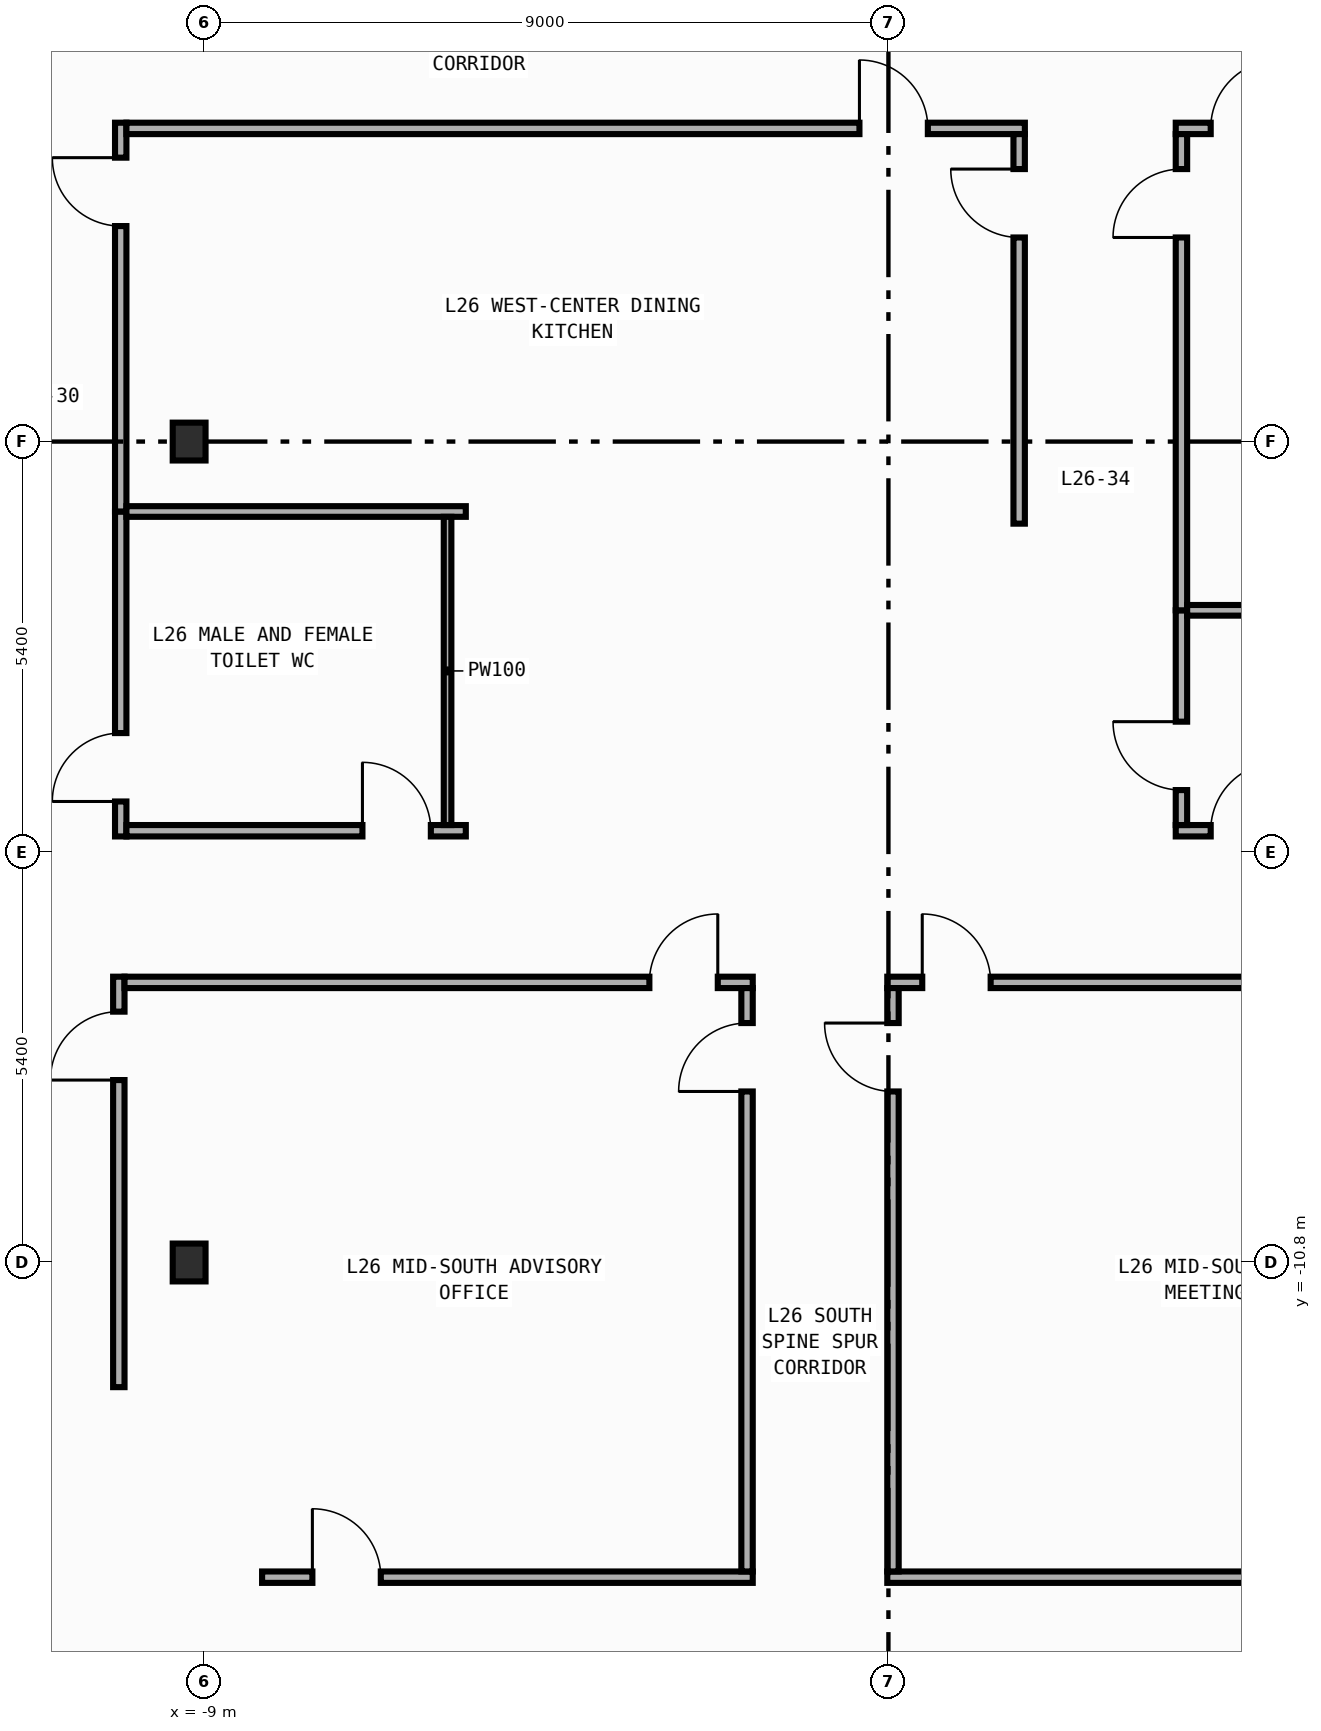
"""IFC4 building model, lengths in metres.
Left out: names, types, materials, properties, quantities, classifications, styles, units other than length and angle.
Written with IfcOpenShell. Run it as: python <this file> out.ifc"""

import sys

from ifc_helpers import new_model, si_unit, direction, frame, frame_2d, origin, origin_2d, place, context, subcontext, project, spatial, rectangle, i_section, extrude, element, fill, save


model = new_model("IFC4")
c1 = context("Model", 3, precision=1e-05, world=origin(), true_north=direction((0.0, 1.0)))
c2 = subcontext(c1, "Body", "Model", "MODEL_VIEW")
j1 = project(units=[si_unit("LENGTHUNIT", "METRE"), si_unit("PLANEANGLEUNIT", "RADIAN")], contexts=[c1])
p1 = place(None, origin())
s1 = spatial("IfcSite", under=j1, at=p1, CompositionType="ELEMENT")
p2 = place(p1, origin())
s2 = spatial("IfcBuilding", under=s1, at=p2, CompositionType="ELEMENT")
p3 = place(p2, frame((0.0, 0.0, 114.2)))
s3 = spatial("IfcBuildingStorey", under=s2, at=p3, CompositionType="ELEMENT", Elevation=114.2)
for number, where, z_axis, x_axis in (
    (1, (-9.2, -10.8, 0.0), (0.0, 0.0, 1.0), (1.0, 0.0, 0.0)),
    (2, (-9.2, 0.0, 0.0), (0.0, 0.0, 1.0), (1.0, 0.0, 0.0)),
):
    element("IfcColumn", number, at=place(p3, frame(where, z_axis=z_axis, x_axis=x_axis)), inside=s3, PredefinedType="COLUMN", context=c2, shape_type="SweptSolid", body=[
        extrude(i_section(OverallWidth=0.432, OverallDepth=0.498, WebThickness=0.045, FlangeThickness=0.07, FilletRadius=0.022, at=origin_2d()), origin(), (0.0, 0.0, 1.0), 4.2),
    ])
p4 = place(p3, frame((-10.1, -5.195, 0.0), z_axis=(0.0, 0.0, 1.0), x_axis=(0.0, 1.0, 0.0)))
e3 = element("IfcWall", 3, at=p4, inside=s3, PredefinedType="PARTITIONING", context=c2, shape_type="SweptSolid", body=[
    extrude(rectangle(XDim=4.275, YDim=0.15, at=frame_2d((2.138, 0.0))), origin(), (0.0, 0.0, 1.0), 3.94),
])
p5 = place(p4, frame((0.46, 0.0, 0.0)))
e4 = element("IfcOpeningElement", 4, at=p5, cuts=e3, PredefinedType="OPENING", context=c2, shape_type="SweptSolid", body=[
    extrude(rectangle(XDim=0.9, YDim=2.15, at=frame_2d((0.45, 1.075))), frame((0.0, 0.085, 0.0), z_axis=(0.0, -1.0, 0.0), x_axis=(1.0, 0.0, 0.0)), (0.0, 0.0, 1.0), 0.17),
])
p6 = place(p3, frame((-10.1, -0.92, 0.0), z_axis=(0.0, 0.0, 1.0), x_axis=(0.0, 1.0, 0.0)))
e5 = element("IfcWall", 5, at=p6, inside=s3, PredefinedType="PARTITIONING", context=c2, shape_type="SweptSolid", body=[
    extrude(rectangle(XDim=5.115, YDim=0.15, at=frame_2d((2.558, 0.0))), origin(), (0.0, 0.0, 1.0), 3.94),
])
p7 = place(p6, frame((3.755, 0.0, 0.0)))
e6 = element("IfcOpeningElement", 6, at=p7, cuts=e5, PredefinedType="OPENING", context=c2, shape_type="SweptSolid", body=[
    extrude(rectangle(XDim=0.9, YDim=2.15, at=frame_2d((0.45, 1.075))), frame((0.0, 0.085, 0.0), z_axis=(0.0, -1.0, 0.0), x_axis=(1.0, 0.0, 0.0)), (0.0, 0.0, 1.0), 0.17),
])
p8 = place(p3, frame((-10.125, -12.44, 0.0), z_axis=(0.0, 0.0, 1.0), x_axis=(0.0, 1.0, 0.0)))
e7 = element("IfcWall", 7, at=p8, inside=s3, PredefinedType="PARTITIONING", context=c2, shape_type="SweptSolid", body=[
    extrude(rectangle(XDim=5.4, YDim=0.15, at=frame_2d((2.7, 0.0))), origin(), (0.0, 0.0, 1.0), 3.94),
])
p9 = place(p8, frame((4.04, 0.0, 0.0)))
e8 = element("IfcOpeningElement", 8, at=p9, cuts=e7, PredefinedType="OPENING", context=c2, shape_type="SweptSolid", body=[
    extrude(rectangle(XDim=0.9, YDim=2.15, at=frame_2d((0.45, 1.075))), frame((0.0, 0.085, 0.0), z_axis=(0.0, -1.0, 0.0), x_axis=(1.0, 0.0, 0.0)), (0.0, 0.0, 1.0), 0.17),
])
p10 = place(p3, frame((3.78, 4.12, 0.0), z_axis=(0.0, 0.0, 1.0), x_axis=(1.0, 0.0, 0.0)))
e9 = element("IfcWall", 9, at=p10, inside=s3, PredefinedType="PARTITIONING", context=c2, shape_type="SweptSolid", body=[
    extrude(rectangle(XDim=6.245, YDim=0.15, at=frame_2d((3.123, 0.0))), origin(), (0.0, 0.0, 1.0), 3.94),
])
p11 = place(p10, frame((0.46, 0.0, 0.0)))
e10 = element("IfcOpeningElement", 10, at=p11, cuts=e9, PredefinedType="OPENING", context=c2, shape_type="SweptSolid", body=[
    extrude(rectangle(XDim=0.9, YDim=2.15, at=frame_2d((0.45, 1.075))), frame((0.0, 0.085, 0.0), z_axis=(0.0, -1.0, 0.0), x_axis=(1.0, 0.0, 0.0)), (0.0, 0.0, 1.0), 0.17),
])
p12 = place(p3, frame((-10.025, 4.12, 0.0), z_axis=(0.0, 0.0, 1.0), x_axis=(1.0, 0.0, 0.0)))
e11 = element("IfcWall", 11, at=p12, inside=s3, PredefinedType="PARTITIONING", context=c2, shape_type="SweptSolid", body=[
    extrude(rectangle(XDim=11.82, YDim=0.15, at=frame_2d((5.91, 0.0))), origin(), (0.0, 0.0, 1.0), 3.94),
])
p13 = place(p12, frame((9.644, 0.0, 0.0)))
e12 = element("IfcOpeningElement", 12, at=p13, cuts=e11, PredefinedType="OPENING", context=c2, shape_type="SweptSolid", body=[
    extrude(rectangle(XDim=0.9, YDim=2.15, at=frame_2d((0.45, 1.075))), frame((0.0, 0.085, 0.0), z_axis=(0.0, -1.0, 0.0), x_axis=(1.0, 0.0, 0.0)), (0.0, 0.0, 1.0), 0.17),
])
p14 = place(p3, frame((3.78, -5.12, 0.0), z_axis=(0.0, 0.0, 1.0), x_axis=(1.0, 0.0, 0.0)))
e13 = element("IfcWall", 13, at=p14, inside=s3, PredefinedType="PARTITIONING", context=c2, shape_type="SweptSolid", body=[
    extrude(rectangle(XDim=3.26, YDim=0.15, at=frame_2d((1.63, 0.0))), origin(), (0.0, 0.0, 1.0), 3.94),
])
p15 = place(p14, frame((0.46, 0.0, 0.0)))
e14 = element("IfcOpeningElement", 14, at=p15, cuts=e13, PredefinedType="OPENING", context=c2, shape_type="SweptSolid", body=[
    extrude(rectangle(XDim=0.9, YDim=2.15, at=frame_2d((0.45, 1.075))), frame((0.0, 0.085, 0.0), z_axis=(0.0, -1.0, 0.0), x_axis=(1.0, 0.0, 0.0)), (0.0, 0.0, 1.0), 0.17),
])
p16 = place(p3, frame((-10.025, -5.12, 0.0), z_axis=(0.0, 0.0, 1.0), x_axis=(1.0, 0.0, 0.0)))
e15 = element("IfcWall", 15, at=p16, inside=s3, PredefinedType="PARTITIONING", context=c2, shape_type="SweptSolid", body=[
    extrude(rectangle(XDim=4.465, YDim=0.15, at=frame_2d((2.232, 0.0))), origin(), (0.0, 0.0, 1.0), 3.94),
])
p17 = place(p16, frame((3.105, 0.0, 0.0)))
e16 = element("IfcOpeningElement", 16, at=p17, cuts=e15, PredefinedType="OPENING", context=c2, shape_type="SweptSolid", body=[
    extrude(rectangle(XDim=0.9, YDim=2.15, at=frame_2d((0.45, 1.075))), frame((0.0, 0.085, 0.0), z_axis=(0.0, -1.0, 0.0), x_axis=(1.0, 0.0, 0.0)), (0.0, 0.0, 1.0), 0.17),
])
p18 = place(p3, frame((-10.05, -7.115, 0.0), z_axis=(0.0, 0.0, 1.0), x_axis=(1.0, 0.0, 0.0)))
e17 = element("IfcWall", 17, at=p18, inside=s3, PredefinedType="PARTITIONING", context=c2, shape_type="SweptSolid", body=[
    extrude(rectangle(XDim=8.265, YDim=0.15, at=frame_2d((4.133, 0.0))), origin(), (0.0, 0.0, 1.0), 3.94),
])
p19 = place(p18, frame((6.905, 0.0, 0.0)))
e18 = element("IfcOpeningElement", 18, at=p19, cuts=e17, PredefinedType="OPENING", context=c2, shape_type="SweptSolid", body=[
    extrude(rectangle(XDim=0.9, YDim=2.15, at=frame_2d((0.45, 1.075))), frame((0.0, 0.085, 0.0), z_axis=(0.0, -1.0, 0.0), x_axis=(1.0, 0.0, 0.0)), (0.0, 0.0, 1.0), 0.17),
])
p20 = place(p3, frame((-0.015, -7.115, 0.0), z_axis=(0.0, 0.0, 1.0), x_axis=(1.0, 0.0, 0.0)))
e19 = element("IfcWall", 19, at=p20, inside=s3, PredefinedType="PARTITIONING", context=c2, shape_type="SweptSolid", body=[
    extrude(rectangle(XDim=10.065, YDim=0.15, at=frame_2d((5.032, 0.0))), origin(), (0.0, 0.0, 1.0), 3.94),
])
p21 = place(p20, frame((0.46, 0.0, 0.0)))
e20 = element("IfcOpeningElement", 20, at=p21, cuts=e19, PredefinedType="OPENING", context=c2, shape_type="SweptSolid", body=[
    extrude(rectangle(XDim=0.9, YDim=2.15, at=frame_2d((0.45, 1.075))), frame((0.0, 0.085, 0.0), z_axis=(0.0, -1.0, 0.0), x_axis=(1.0, 0.0, 0.0)), (0.0, 0.0, 1.0), 0.17),
])
p22 = place(p3, frame((3.855, -5.045, 0.0), z_axis=(0.0, 0.0, 1.0), x_axis=(0.0, 1.0, 0.0)))
e21 = element("IfcWall", 21, at=p22, inside=s3, PredefinedType="PARTITIONING", context=c2, shape_type="SweptSolid", body=[
    extrude(rectangle(XDim=2.825, YDim=0.15, at=frame_2d((1.413, 0.0))), origin(), (0.0, 0.0, 1.0), 3.94),
])
p23 = place(p22, frame((0.46, 0.0, 0.0)))
e22 = element("IfcOpeningElement", 22, at=p23, cuts=e21, PredefinedType="OPENING", context=c2, shape_type="SweptSolid", body=[
    extrude(rectangle(XDim=0.9, YDim=2.15, at=frame_2d((0.45, 1.075))), frame((0.0, 0.085, 0.0), z_axis=(0.0, -1.0, 0.0), x_axis=(1.0, 0.0, 0.0)), (0.0, 0.0, 1.0), 0.17),
])
p24 = place(p3, frame((3.855, -2.22, 0.0), z_axis=(0.0, 0.0, 1.0), x_axis=(0.0, 1.0, 0.0)))
e23 = element("IfcWall", 23, at=p24, inside=s3, PredefinedType="PARTITIONING", context=c2, shape_type="SweptSolid", body=[
    extrude(rectangle(XDim=6.265, YDim=0.15, at=frame_2d((3.132, 0.0))), origin(), (0.0, 0.0, 1.0), 3.94),
])
p25 = place(p24, frame((4.905, 0.0, 0.0)))
e24 = element("IfcOpeningElement", 24, at=p25, cuts=e23, PredefinedType="OPENING", context=c2, shape_type="SweptSolid", body=[
    extrude(rectangle(XDim=0.9, YDim=2.15, at=frame_2d((0.45, 1.075))), frame((0.0, 0.085, 0.0), z_axis=(0.0, -1.0, 0.0), x_axis=(1.0, 0.0, 0.0)), (0.0, 0.0, 1.0), 0.17),
])
p26 = place(p3, frame((1.72, -1.08, 0.0), z_axis=(0.0, 0.0, 1.0), x_axis=(0.0, 1.0, 0.0)))
e25 = element("IfcWall", 25, at=p26, inside=s3, PredefinedType="PARTITIONING", context=c2, shape_type="SweptSolid", body=[
    extrude(rectangle(XDim=5.125, YDim=0.15, at=frame_2d((2.562, 0.0))), origin(), (0.0, 0.0, 1.0), 3.94),
])
p27 = place(p26, frame((3.765, 0.0, 0.0)))
e26 = element("IfcOpeningElement", 26, at=p27, cuts=e25, PredefinedType="OPENING", context=c2, shape_type="SweptSolid", body=[
    extrude(rectangle(XDim=0.9, YDim=2.15, at=frame_2d((0.45, 1.075))), frame((0.0, 0.085, 0.0), z_axis=(0.0, -1.0, 0.0), x_axis=(1.0, 0.0, 0.0)), (0.0, 0.0, 1.0), 0.17),
])
p28 = place(p3, frame((-8.24, -14.94, 0.0), z_axis=(0.0, 0.0, 1.0), x_axis=(1.0, 0.0, 0.0)))
e27 = element("IfcWall", 27, at=p28, inside=s3, PredefinedType="PARTITIONING", context=c2, shape_type="SweptSolid", body=[
    extrude(rectangle(XDim=6.455, YDim=0.15, at=frame_2d((3.228, 0.0))), origin(), (0.0, 0.0, 1.0), 3.94),
])
p29 = place(p28, frame((0.662, 0.0, 0.0)))
e28 = element("IfcOpeningElement", 28, at=p29, cuts=e27, PredefinedType="OPENING", context=c2, shape_type="SweptSolid", body=[
    extrude(rectangle(XDim=0.9, YDim=2.15, at=frame_2d((0.45, 1.075))), frame((0.0, 0.085, 0.0), z_axis=(0.0, -1.0, 0.0), x_axis=(1.0, 0.0, 0.0)), (0.0, 0.0, 1.0), 0.17),
])
p30 = place(p3, frame((-0.015, -14.94, 0.0), z_axis=(0.0, 0.0, 1.0), x_axis=(1.0, 0.0, 0.0)))
e29 = element("IfcWall", 29, at=p30, inside=s3, PredefinedType="PARTITIONING", context=c2, shape_type="SweptSolid", body=[
    extrude(rectangle(XDim=8.255, YDim=0.15, at=frame_2d((4.127, 0.0))), origin(), (0.0, 0.0, 1.0), 3.94),
])
p31 = place(p30, frame((6.694, 0.0, 0.0)))
e30 = element("IfcOpeningElement", 30, at=p31, cuts=e29, PredefinedType="OPENING", context=c2, shape_type="SweptSolid", body=[
    extrude(rectangle(XDim=0.9, YDim=2.15, at=frame_2d((0.45, 1.075))), frame((0.0, 0.085, 0.0), z_axis=(0.0, -1.0, 0.0), x_axis=(1.0, 0.0, 0.0)), (0.0, 0.0, 1.0), 0.17),
])
p32 = place(p3, frame((-1.86, -14.865, 0.0), z_axis=(0.0, 0.0, 1.0), x_axis=(0.0, 1.0, 0.0)))
e31 = element("IfcWall", 31, at=p32, inside=s3, PredefinedType="PARTITIONING", context=c2, shape_type="SweptSolid", body=[
    extrude(rectangle(XDim=7.675, YDim=0.15, at=frame_2d((3.837, 0.0))), origin(), (0.0, 0.0, 1.0), 3.94),
])
p33 = place(p32, frame((6.315, 0.0, 0.0)))
e32 = element("IfcOpeningElement", 32, at=p33, cuts=e31, PredefinedType="OPENING", context=c2, shape_type="SweptSolid", body=[
    extrude(rectangle(XDim=0.9, YDim=2.15, at=frame_2d((0.45, 1.075))), frame((0.0, 0.085, 0.0), z_axis=(0.0, -1.0, 0.0), x_axis=(1.0, 0.0, 0.0)), (0.0, 0.0, 1.0), 0.17),
])
p34 = place(p3, frame((0.06, -14.865, 0.0), z_axis=(0.0, 0.0, 1.0), x_axis=(0.0, 1.0, 0.0)))
e33 = element("IfcWall", 33, at=p34, inside=s3, PredefinedType="PARTITIONING", context=c2, shape_type="SweptSolid", body=[
    extrude(rectangle(XDim=7.675, YDim=0.15, at=frame_2d((3.837, 0.0))), origin(), (0.0, 0.0, 1.0), 3.94),
])
p35 = place(p34, frame((6.315, 0.0, 0.0)))
e34 = element("IfcOpeningElement", 34, at=p35, cuts=e33, PredefinedType="OPENING", context=c2, shape_type="SweptSolid", body=[
    extrude(rectangle(XDim=0.9, YDim=2.15, at=frame_2d((0.45, 1.075))), frame((0.0, 0.085, 0.0), z_axis=(0.0, -1.0, 0.0), x_axis=(1.0, 0.0, 0.0)), (0.0, 0.0, 1.0), 0.17),
])
p36 = place(p3, frame((3.93, -2.22, 0.0), z_axis=(0.0, 0.0, 1.0), x_axis=(1.0, 0.0, 0.0)))
e35 = element("IfcWall", 35, at=p36, inside=s3, PredefinedType="PARTITIONING", context=c2, shape_type="SweptSolid", body=[
    extrude(rectangle(XDim=3.11, YDim=0.14, at=frame_2d((1.555, 0.0))), origin(), (0.0, 0.0, 1.0), 3.94),
])
p37 = place(p3, frame((-10.025, -0.92, 0.0), z_axis=(0.0, 0.0, 1.0), x_axis=(1.0, 0.0, 0.0)))
e36 = element("IfcWall", 36, at=p37, inside=s3, PredefinedType="PARTITIONING", context=c2, shape_type="SweptSolid", body=[
    extrude(rectangle(XDim=4.465, YDim=0.14, at=frame_2d((2.232, 0.0))), origin(), (0.0, 0.0, 1.0), 3.94),
])
p38 = place(p3, frame((-5.8, -0.99, 0.0), z_axis=(0.0, 0.0, 1.0), x_axis=(0.0, -1.0, 0.0)))
e37 = element("IfcWall", 37, at=p38, inside=s3, PredefinedType="PARTITIONING", context=c2, shape_type="SweptSolid", body=[
    extrude(rectangle(XDim=4.055, YDim=0.1, at=frame_2d((2.027, 0.0))), origin(), (0.0, 0.0, 1.0), 3.94),
])
p39 = place(p5, origin())
e38 = element("IfcDoor", 38, at=p39, inside=s3, OperationType="SINGLE_SWING_LEFT", PredefinedType="DOOR", context=c2, shape_type="SweptSolid", body=[
    extrude(rectangle(XDim=0.9, YDim=2.15, at=frame_2d((0.45, 1.075))), frame((0.0, 0.025, 0.0), z_axis=(0.0, -1.0, 0.0), x_axis=(1.0, 0.0, 0.0)), (0.0, 0.0, 1.0), 0.05),
])
fill(e4, e38)
p40 = place(p7, origin())
e39 = element("IfcDoor", 39, at=p40, inside=s3, OperationType="SINGLE_SWING_RIGHT", PredefinedType="DOOR", context=c2, shape_type="SweptSolid", body=[
    extrude(rectangle(XDim=0.9, YDim=2.15, at=frame_2d((0.45, 1.075))), frame((0.0, 0.025, 0.0), z_axis=(0.0, -1.0, 0.0), x_axis=(1.0, 0.0, 0.0)), (0.0, 0.0, 1.0), 0.05),
])
fill(e6, e39)
p41 = place(p9, origin())
e40 = element("IfcDoor", 40, at=p41, inside=s3, OperationType="SINGLE_SWING_LEFT", PredefinedType="DOOR", context=c2, shape_type="SweptSolid", body=[
    extrude(rectangle(XDim=0.9, YDim=2.15, at=frame_2d((0.45, 1.075))), frame((0.0, 0.025, 0.0), z_axis=(0.0, -1.0, 0.0), x_axis=(1.0, 0.0, 0.0)), (0.0, 0.0, 1.0), 0.05),
])
fill(e8, e40)
p42 = place(p11, origin())
e41 = element("IfcDoor", 41, at=p42, inside=s3, OperationType="SINGLE_SWING_RIGHT", PredefinedType="DOOR", context=c2, shape_type="SweptSolid", body=[
    extrude(rectangle(XDim=0.9, YDim=2.15, at=frame_2d((0.45, 1.075))), frame((0.0, 0.025, 0.0), z_axis=(0.0, -1.0, 0.0), x_axis=(1.0, 0.0, 0.0)), (0.0, 0.0, 1.0), 0.05),
])
fill(e10, e41)
p43 = place(p13, origin())
e42 = element("IfcDoor", 42, at=p43, inside=s3, OperationType="SINGLE_SWING_LEFT", PredefinedType="DOOR", context=c2, shape_type="SweptSolid", body=[
    extrude(rectangle(XDim=0.9, YDim=2.15, at=frame_2d((0.45, 1.075))), frame((0.0, 0.025, 0.0), z_axis=(0.0, -1.0, 0.0), x_axis=(1.0, 0.0, 0.0)), (0.0, 0.0, 1.0), 0.05),
])
fill(e12, e42)
p44 = place(p15, origin())
e43 = element("IfcDoor", 43, at=p44, inside=s3, OperationType="SINGLE_SWING_RIGHT", PredefinedType="DOOR", context=c2, shape_type="SweptSolid", body=[
    extrude(rectangle(XDim=0.9, YDim=2.15, at=frame_2d((0.45, 1.075))), frame((0.0, 0.025, 0.0), z_axis=(0.0, -1.0, 0.0), x_axis=(1.0, 0.0, 0.0)), (0.0, 0.0, 1.0), 0.05),
])
fill(e14, e43)
p45 = place(p17, origin())
e44 = element("IfcDoor", 44, at=p45, inside=s3, OperationType="SINGLE_SWING_LEFT", PredefinedType="DOOR", context=c2, shape_type="SweptSolid", body=[
    extrude(rectangle(XDim=0.9, YDim=2.15, at=frame_2d((0.45, 1.075))), frame((0.0, 0.025, 0.0), z_axis=(0.0, -1.0, 0.0), x_axis=(1.0, 0.0, 0.0)), (0.0, 0.0, 1.0), 0.05),
])
fill(e16, e44)
p46 = place(p19, origin())
e45 = element("IfcDoor", 45, at=p46, inside=s3, OperationType="SINGLE_SWING_RIGHT", PredefinedType="DOOR", context=c2, shape_type="SweptSolid", body=[
    extrude(rectangle(XDim=0.9, YDim=2.15, at=frame_2d((0.45, 1.075))), frame((0.0, 0.025, 0.0), z_axis=(0.0, -1.0, 0.0), x_axis=(1.0, 0.0, 0.0)), (0.0, 0.0, 1.0), 0.05),
])
fill(e18, e45)
p47 = place(p21, origin())
e46 = element("IfcDoor", 46, at=p47, inside=s3, OperationType="SINGLE_SWING_LEFT", PredefinedType="DOOR", context=c2, shape_type="SweptSolid", body=[
    extrude(rectangle(XDim=0.9, YDim=2.15, at=frame_2d((0.45, 1.075))), frame((0.0, 0.025, 0.0), z_axis=(0.0, -1.0, 0.0), x_axis=(1.0, 0.0, 0.0)), (0.0, 0.0, 1.0), 0.05),
])
fill(e20, e46)
p48 = place(p23, origin())
e47 = element("IfcDoor", 47, at=p48, inside=s3, OperationType="SINGLE_SWING_RIGHT", PredefinedType="DOOR", context=c2, shape_type="SweptSolid", body=[
    extrude(rectangle(XDim=0.9, YDim=2.15, at=frame_2d((0.45, 1.075))), frame((0.0, 0.025, 0.0), z_axis=(0.0, -1.0, 0.0), x_axis=(1.0, 0.0, 0.0)), (0.0, 0.0, 1.0), 0.05),
])
fill(e22, e47)
p49 = place(p25, origin())
e48 = element("IfcDoor", 48, at=p49, inside=s3, OperationType="SINGLE_SWING_LEFT", PredefinedType="DOOR", context=c2, shape_type="SweptSolid", body=[
    extrude(rectangle(XDim=0.9, YDim=2.15, at=frame_2d((0.45, 1.075))), frame((0.0, 0.025, 0.0), z_axis=(0.0, -1.0, 0.0), x_axis=(1.0, 0.0, 0.0)), (0.0, 0.0, 1.0), 0.05),
])
fill(e24, e48)
p50 = place(p27, origin())
e49 = element("IfcDoor", 49, at=p50, inside=s3, OperationType="SINGLE_SWING_RIGHT", PredefinedType="DOOR", context=c2, shape_type="SweptSolid", body=[
    extrude(rectangle(XDim=0.9, YDim=2.15, at=frame_2d((0.45, 1.075))), frame((0.0, 0.025, 0.0), z_axis=(0.0, -1.0, 0.0), x_axis=(1.0, 0.0, 0.0)), (0.0, 0.0, 1.0), 0.05),
])
fill(e26, e49)
p51 = place(p29, origin())
e50 = element("IfcDoor", 50, at=p51, inside=s3, OperationType="SINGLE_SWING_LEFT", PredefinedType="DOOR", context=c2, shape_type="SweptSolid", body=[
    extrude(rectangle(XDim=0.9, YDim=2.15, at=frame_2d((0.45, 1.075))), frame((0.0, 0.025, 0.0), z_axis=(0.0, -1.0, 0.0), x_axis=(1.0, 0.0, 0.0)), (0.0, 0.0, 1.0), 0.05),
])
fill(e28, e50)
p52 = place(p33, origin())
e51 = element("IfcDoor", 51, at=p52, inside=s3, OperationType="SINGLE_SWING_LEFT", PredefinedType="DOOR", context=c2, shape_type="SweptSolid", body=[
    extrude(rectangle(XDim=0.9, YDim=2.15, at=frame_2d((0.45, 1.075))), frame((0.0, 0.025, 0.0), z_axis=(0.0, -1.0, 0.0), x_axis=(1.0, 0.0, 0.0)), (0.0, 0.0, 1.0), 0.05),
])
fill(e32, e51)
p53 = place(p35, origin())
e52 = element("IfcDoor", 52, at=p53, inside=s3, OperationType="SINGLE_SWING_RIGHT", PredefinedType="DOOR", context=c2, shape_type="SweptSolid", body=[
    extrude(rectangle(XDim=0.9, YDim=2.15, at=frame_2d((0.45, 1.075))), frame((0.0, 0.025, 0.0), z_axis=(0.0, -1.0, 0.0), x_axis=(1.0, 0.0, 0.0)), (0.0, 0.0, 1.0), 0.05),
])
fill(e34, e52)
save(model, sys.argv[1])
